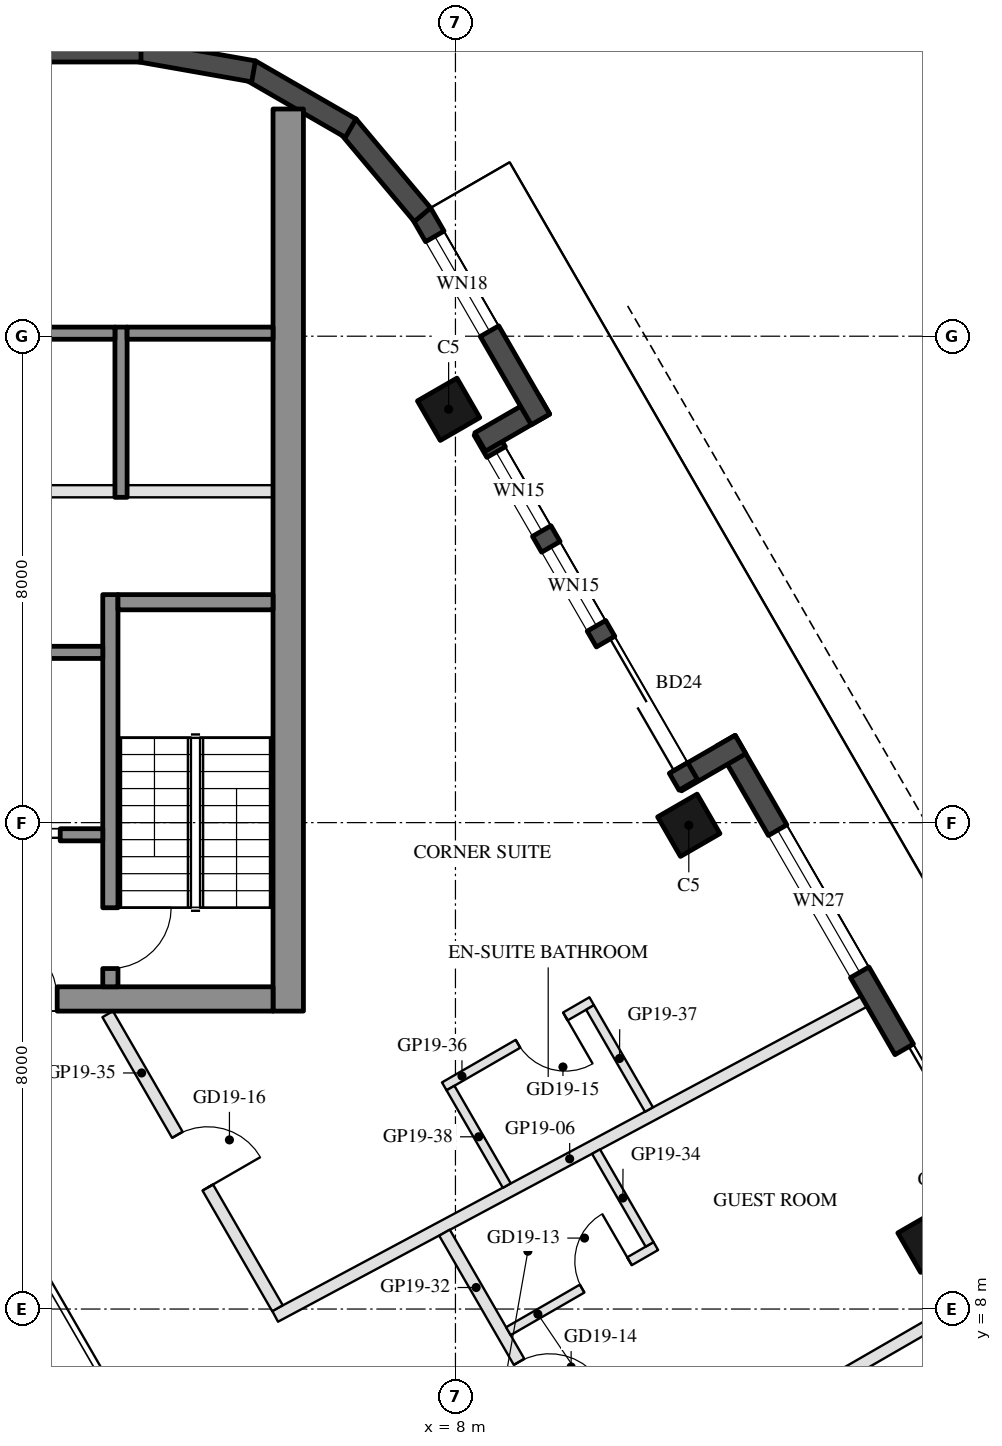
"""IFC4 building model, lengths in metres.
Left out: names, types, materials, properties, quantities, classifications, styles, units other than length and angle.
Written with IfcOpenShell. Run it as: python <this file> out.ifc"""

import sys

from ifc_helpers import new_model, si_unit, direction, frame, frame_2d, origin, origin_2d, place, context, subcontext, project, spatial, rectangle, hollow_rectangle, extrude, element, fill, save


model = new_model("IFC4")
c1 = context("Model", 3, precision=1e-05, world=origin(), true_north=direction((0.0, 1.0)))
c2 = subcontext(c1, "Body", "Model", "MODEL_VIEW")
j1 = project(units=[si_unit("LENGTHUNIT", "METRE"), si_unit("PLANEANGLEUNIT", "RADIAN")], contexts=[c1])
p1 = place(None, origin())
s1 = spatial("IfcSite", under=j1, at=p1, CompositionType="ELEMENT")
p2 = place(p1, origin())
s2 = spatial("IfcBuilding", under=s1, at=p2, CompositionType="ELEMENT")
p3 = place(p2, frame((0.0, 0.0, 205.8)))
s3 = spatial("IfcBuildingStorey", under=s2, at=p3, CompositionType="ELEMENT", Elevation=205.8)
for number, where, z_axis, x_axis in (
    (1, (15.788, 9.115, 0.0), (0.0, 0.0, 1.0), (-0.5, 0.866, 0.0)),
    (2, (11.838, 15.957, 0.0), (0.0, 0.0, 1.0), (-0.5, 0.866, 0.0)),
    (3, (7.888, 22.798, 0.0), (0.0, 0.0, 1.0), (-0.5, 0.866, 0.0)),
):
    element("IfcColumn", number, at=place(p3, frame(where, z_axis=z_axis, x_axis=x_axis)), inside=s3, PredefinedType="COLUMN", context=c2, shape_type="SweptSolid", body=[
        extrude(hollow_rectangle(XDim=0.75, YDim=0.75, WallThickness=0.035, at=origin_2d()), origin(), (0.0, 0.0, 1.0), 3.7),
    ])
p4 = place(p3, frame((17.299, 8.948, 0.0), z_axis=(0.0, 0.0, 1.0), x_axis=(-0.500010041276, 0.866019606374, 0.0)))
e4 = element("IfcWall", 4, at=p4, inside=s3, PredefinedType="SOLIDWALL", context=c2, shape_type="SweptSolid", body=[
    extrude(rectangle(XDim=9.7, YDim=0.35, at=frame_2d((4.85, 0.0))), origin(), (0.0, 0.0, 1.0), 3.55),
])
p5 = place(p4, frame((2.037, 0.0, 0.0)))
e5 = element("IfcOpeningElement", 5, at=p5, cuts=e4, PredefinedType="OPENING", context=c2, shape_type="SweptSolid", body=[
    extrude(rectangle(XDim=1.8, YDim=2.4, at=frame_2d((0.9, 1.2))), frame((0.0, 0.185, 0.0), z_axis=(0.0, -1.0, 0.0), x_axis=(1.0, 0.0, 0.0)), (0.0, 0.0, 1.0), 0.37),
])
p6 = place(p4, frame((5.3, 0.0, 0.3)))
e6 = element("IfcOpeningElement", 6, at=p6, cuts=e4, PredefinedType="OPENING", context=c2, shape_type="SweptSolid", body=[
    extrude(rectangle(XDim=2.7, YDim=2.65, at=frame_2d((1.35, 1.325))), frame((0.0, 0.185, 0.0), z_axis=(0.0, -1.0, 0.0), x_axis=(1.0, 0.0, 0.0)), (0.0, 0.0, 1.0), 0.37),
])
p7 = place(p3, frame((12.688, 17.284, 0.0), z_axis=(0.0, 0.0, 1.0), x_axis=(-0.865955602162, -0.500120880472, 0.0)))
e7 = element("IfcWall", 7, at=p7, inside=s3, PredefinedType="SOLIDWALL", context=c2, shape_type="SweptSolid", body=[
    extrude(rectangle(XDim=1.22, YDim=0.35, at=frame_2d((0.61, 0.0))), origin(), (0.0, 0.0, 1.0), 3.55),
])
p8 = place(p3, frame((11.829, 16.621, 0.0), z_axis=(0.0, 0.0, 1.0), x_axis=(-0.500003597184, 0.866023326939, 0.0)))
e8 = element("IfcWall", 8, at=p8, inside=s3, PredefinedType="SOLIDWALL", context=c2, shape_type="SweptSolid", body=[
    extrude(rectangle(XDim=6.74, YDim=0.35, at=frame_2d((3.37, 0.0))), origin(), (0.0, 0.0, 1.0), 3.55),
])
p9 = place(p8, frame((0.32, 0.0, 0.0)))
e9 = element("IfcOpeningElement", 9, at=p9, cuts=e8, PredefinedType="OPENING", context=c2, shape_type="SweptSolid", body=[
    extrude(rectangle(XDim=2.4, YDim=2.4, at=frame_2d((1.2, 1.2))), frame((0.0, 0.185, 0.0), z_axis=(0.0, -1.0, 0.0), x_axis=(1.0, 0.0, 0.0)), (0.0, 0.0, 1.0), 0.37),
])
p10 = place(p8, frame((3.02, 0.0, 0.3)))
e10 = element("IfcOpeningElement", 10, at=p10, cuts=e8, PredefinedType="OPENING", context=c2, shape_type="SweptSolid", body=[
    extrude(rectangle(XDim=1.5, YDim=2.65, at=frame_2d((0.75, 1.325))), frame((0.0, 0.185, 0.0), z_axis=(0.0, -1.0, 0.0), x_axis=(1.0, 0.0, 0.0)), (0.0, 0.0, 1.0), 0.37),
])
p11 = place(p8, frame((4.82, 0.0, 0.3)))
e11 = element("IfcOpeningElement", 11, at=p11, cuts=e8, PredefinedType="OPENING", context=c2, shape_type="SweptSolid", body=[
    extrude(rectangle(XDim=1.5, YDim=2.65, at=frame_2d((0.75, 1.325))), frame((0.0, 0.185, 0.0), z_axis=(0.0, -1.0, 0.0), x_axis=(1.0, 0.0, 0.0)), (0.0, 0.0, 1.0), 0.37),
])
p12 = place(p3, frame((8.406, 22.26, 0.0), z_axis=(0.0, 0.0, 1.0), x_axis=(0.865955602162, 0.500120880472, 0.0)))
e12 = element("IfcWall", 12, at=p12, inside=s3, PredefinedType="SOLIDWALL", context=c2, shape_type="SweptSolid", body=[
    extrude(rectangle(XDim=1.22, YDim=0.35, at=frame_2d((0.61, 0.0))), origin(), (0.0, 0.0, 1.0), 3.55),
])
p13 = place(p3, frame((9.398, 22.631, 0.0), z_axis=(0.0, 0.0, 1.0), x_axis=(-0.499954521343, 0.866051659307, 0.0)))
e13 = element("IfcWall", 13, at=p13, inside=s3, PredefinedType="SOLIDWALL", context=c2, shape_type="SweptSolid", body=[
    extrude(rectangle(XDim=3.916, YDim=0.35, at=frame_2d((1.958, 0.0))), origin(), (0.0, 0.0, 1.0), 3.55),
])
p14 = place(p13, frame((1.676, 0.0, 0.3)))
e14 = element("IfcOpeningElement", 14, at=p14, cuts=e13, PredefinedType="OPENING", context=c2, shape_type="SweptSolid", body=[
    extrude(rectangle(XDim=1.8, YDim=2.65, at=frame_2d((0.9, 1.325))), frame((0.0, 0.185, 0.0), z_axis=(0.0, -1.0, 0.0), x_axis=(1.0, 0.0, 0.0)), (0.0, 0.0, 1.0), 0.37),
])
p15 = place(p3, frame((7.458, 25.998, 0.0), z_axis=(0.0, 0.0, 1.0), x_axis=(-0.642808304945, 0.766027077259, 0.0)))
e15 = element("IfcWall", 15, at=p15, inside=s3, PredefinedType="SOLIDWALL", context=c2, shape_type="SweptSolid", body=[
    extrude(rectangle(XDim=1.91, YDim=0.35, at=frame_2d((0.955, 0.0))), origin(), (0.0, 0.0, 1.0), 3.55),
])
for number, where, z_axis, x_axis in (
    (16, (6.277, 27.422, 0.0), (0.0, 0.0, 1.0), (-0.866, 0.5, 0.0)),
    (17, (4.68, 28.356, 0.0), (0.0, 0.0, 1.0), (-0.985, 0.174, 0.0)),
):
    element("IfcWall", number, at=place(p3, frame(where, z_axis=z_axis, x_axis=x_axis)), inside=s3, PredefinedType="SOLIDWALL", context=c2, shape_type="SweptSolid", body=[
        extrude(rectangle(XDim=1.91, YDim=0.35, at=frame_2d((0.955, 0.0))), origin(), (0.0, 0.0, 1.0), 3.55),
    ])
p16 = place(p3, frame((2.829, 28.685, 0.0), z_axis=(0.0, 0.0, 1.0), x_axis=(-1.0, 0.0, 0.0)))
e18 = element("IfcWall", 18, at=p16, inside=s3, PredefinedType="SOLIDWALL", context=c2, shape_type="SweptSolid", body=[
    extrude(rectangle(XDim=5.658, YDim=0.35, at=frame_2d((2.829, 0.0))), origin(), (0.0, 0.0, 1.0), 3.55),
])
p17 = place(p3, frame((5.25, 12.9, 0.0), z_axis=(0.0, 0.0, 1.0), x_axis=(0.0, 1.0, 0.0)))
e19 = element("IfcWall", 19, at=p17, inside=s3, PredefinedType="SHEAR", context=c2, shape_type="SweptSolid", body=[
    extrude(rectangle(XDim=14.837, YDim=0.5, at=frame_2d((7.418, 0.0))), origin(), (0.0, 0.0, 1.0), 3.5),
])
p18 = place(p3, frame((5.0, 13.1, 0.0), z_axis=(0.0, 0.0, 1.0), x_axis=(-1.0, 0.0, 0.0)))
e20 = element("IfcWall", 20, at=p18, inside=s3, PredefinedType="SHEAR", context=c2, shape_type="SweptSolid", body=[
    extrude(rectangle(XDim=10.0, YDim=0.4, at=frame_2d((5.0, 0.0))), origin(), (0.0, 0.0, 1.0), 3.5),
])
p19 = place(p18, frame((3.55, 0.0, 0.0)))
e21 = element("IfcOpeningElement", 21, at=p19, cuts=e20, PredefinedType="OPENING", context=c2, shape_type="SweptSolid", body=[
    extrude(rectangle(XDim=1.1, YDim=2.1, at=frame_2d((0.55, 1.05))), frame((0.0, 0.21, 0.0), z_axis=(0.0, -1.0, 0.0), x_axis=(1.0, 0.0, 0.0)), (0.0, 0.0, 1.0), 0.42),
])
p20 = place(p18, frame((5.85, 0.0, 0.0)))
e22 = element("IfcOpeningElement", 22, at=p20, cuts=e20, PredefinedType="OPENING", context=c2, shape_type="SweptSolid", body=[
    extrude(rectangle(XDim=1.4, YDim=2.1, at=frame_2d((0.7, 1.05))), frame((0.0, 0.21, 0.0), z_axis=(0.0, -1.0, 0.0), x_axis=(1.0, 0.0, 0.0)), (0.0, 0.0, 1.0), 0.42),
])
p21 = place(p3, frame((2.325, 13.3, 0.0), z_axis=(0.0, 0.0, 1.0), x_axis=(0.0, 1.0, 0.0)))
e23 = element("IfcWall", 23, at=p21, inside=s3, PredefinedType="SHEAR", context=c2, shape_type="SweptSolid", body=[
    extrude(rectangle(XDim=6.45, YDim=0.25, at=frame_2d((3.225, 0.0))), origin(), (0.0, 0.0, 1.0), 3.5),
])
p22 = place(p21, frame((0.3, 0.0, 0.0)))
e24 = element("IfcOpeningElement", 24, at=p22, cuts=e23, PredefinedType="OPENING", context=c2, shape_type="SweptSolid", body=[
    extrude(rectangle(XDim=1.0, YDim=2.1, at=frame_2d((0.5, 1.05))), frame((0.0, 0.135, 0.0), z_axis=(0.0, -1.0, 0.0), x_axis=(1.0, 0.0, 0.0)), (0.0, 0.0, 1.0), 0.27),
])
p23 = place(p3, frame((5.0, 19.625, 0.0), z_axis=(0.0, 0.0, 1.0), x_axis=(-1.0, 0.0, 0.0)))
e25 = element("IfcWall", 25, at=p23, inside=s3, PredefinedType="SHEAR", context=c2, shape_type="SweptSolid", body=[
    extrude(rectangle(XDim=2.55, YDim=0.25, at=frame_2d((1.275, 0.0))), origin(), (0.0, 0.0, 1.0), 3.5),
])
p24 = place(p3, frame((2.2, 18.8, 0.0), z_axis=(0.0, 0.0, 1.0), x_axis=(-1.0, 0.0, 0.0)))
e26 = element("IfcWall", 26, at=p24, inside=s3, PredefinedType="SHEAR", context=c2, shape_type="SweptSolid", body=[
    extrude(rectangle(XDim=2.8, YDim=0.2, at=frame_2d((1.4, 0.0))), origin(), (0.0, 0.0, 1.0), 3.5),
])
p25 = place(p3, frame((2.2, 15.8, 0.0), z_axis=(0.0, 0.0, 1.0), x_axis=(-1.0, 0.0, 0.0)))
e27 = element("IfcWall", 27, at=p25, inside=s3, PredefinedType="SHEAR", context=c2, shape_type="SweptSolid", body=[
    extrude(rectangle(XDim=2.8, YDim=0.2, at=frame_2d((1.4, 0.0))), origin(), (0.0, 0.0, 1.0), 3.5),
])
p26 = place(p25, frame((0.7, 0.0, 0.0)))
e28 = element("IfcOpeningElement", 28, at=p26, cuts=e27, PredefinedType="OPENING", context=c2, shape_type="SweptSolid", body=[
    extrude(rectangle(XDim=1.2, YDim=2.1, at=frame_2d((0.6, 1.05))), frame((0.0, 0.11, 0.0), z_axis=(0.0, -1.0, 0.0), x_axis=(1.0, 0.0, 0.0)), (0.0, 0.0, 1.0), 0.22),
])
p27 = place(p3, frame((2.5, 21.35, 0.0), z_axis=(0.0, 0.0, 1.0), x_axis=(0.0, 1.0, 0.0)))
e29 = element("IfcWall", 29, at=p27, inside=s3, PredefinedType="SHEAR", context=c2, shape_type="SweptSolid", body=[
    extrude(rectangle(XDim=2.8, YDim=0.2, at=frame_2d((1.4, 0.0))), origin(), (0.0, 0.0, 1.0), 3.5),
])
p28 = place(p3, frame((5.0, 24.05, 0.0), z_axis=(0.0, 0.0, 1.0), x_axis=(-1.0, 0.0, 0.0)))
e30 = element("IfcWall", 30, at=p28, inside=s3, PredefinedType="SHEAR", context=c2, shape_type="SweptSolid", body=[
    extrude(rectangle(XDim=2.4, YDim=0.2, at=frame_2d((1.2, 0.0))), origin(), (0.0, 0.0, 1.0), 3.5),
])
p29 = place(p3, frame((2.4, 24.05, 0.0), z_axis=(0.0, 0.0, 1.0), x_axis=(-1.0, 0.0, 0.0)))
e31 = element("IfcWall", 31, at=p29, inside=s3, PredefinedType="SHEAR", context=c2, shape_type="SweptSolid", body=[
    extrude(rectangle(XDim=2.8, YDim=0.2, at=frame_2d((1.4, 0.0))), origin(), (0.0, 0.0, 1.0), 3.5),
])
p30 = place(p3, frame((5.0, 21.45, 0.0), z_axis=(0.0, 0.0, 1.0), x_axis=(-1.0, 0.0, 0.0)))
e32 = element("IfcWall", 32, at=p30, inside=s3, PredefinedType="PARTITIONING", context=c2, shape_type="SweptSolid", body=[
    extrude(rectangle(XDim=2.4, YDim=0.2, at=frame_2d((1.2, 0.0))), origin(), (0.0, 0.0, 1.0), 3.5),
])
p31 = place(p3, frame((2.4, 21.45, 0.0), z_axis=(0.0, 0.0, 1.0), x_axis=(-1.0, 0.0, 0.0)))
e33 = element("IfcWall", 33, at=p31, inside=s3, PredefinedType="PARTITIONING", context=c2, shape_type="SweptSolid", body=[
    extrude(rectangle(XDim=2.8, YDim=0.2, at=frame_2d((1.4, 0.0))), origin(), (0.0, 0.0, 1.0), 3.5),
])
p32 = place(p3, frame((16.518, 8.151, 0.0), z_axis=(0.0, 0.0, 1.0), x_axis=(-0.866027673501, -0.499996068715, 0.0)))
e34 = element("IfcWall", 34, at=p32, inside=s3, PredefinedType="PARTITIONING", context=c2, shape_type="SweptSolid", body=[
    extrude(rectangle(XDim=7.08, YDim=0.2, at=frame_2d((3.54, 0.0))), origin(), (0.0, 0.0, 1.0), 3.06),
])
p33 = place(p3, frame((14.722, 13.061, 0.0), z_axis=(0.0, 0.0, 1.0), x_axis=(-0.881785716662, -0.471650241059, 0.0)))
e35 = element("IfcWall", 35, at=p33, inside=s3, PredefinedType="PARTITIONING", context=c2, shape_type="SweptSolid", body=[
    extrude(rectangle(XDim=10.986, YDim=0.2, at=frame_2d((5.493, 0.0))), origin(), (0.0, 0.0, 1.0), 2.95),
])
p34 = place(p3, frame((7.82, 9.256, 0.0), z_axis=(0.0, 0.0, 1.0), x_axis=(0.499987686533, -0.866032512851, 0.0)))
e36 = element("IfcWall", 36, at=p34, inside=s3, PredefinedType="PARTITIONING", context=c2, shape_type="SweptSolid", body=[
    extrude(rectangle(XDim=5.206, YDim=0.2, at=frame_2d((2.603, 0.0))), origin(), (0.0, 0.0, 1.0), 2.95),
])
p35 = place(p34, frame((2.453, 0.0, 0.0)))
e37 = element("IfcOpeningElement", 37, at=p35, cuts=e36, PredefinedType="OPENING", context=c2, shape_type="SweptSolid", body=[
    extrude(rectangle(XDim=1.0, YDim=2.1, at=frame_2d((0.5, 1.05))), frame((0.0, 0.11, 0.0), z_axis=(0.0, -1.0, 0.0), x_axis=(1.0, 0.0, 0.0)), (0.0, 0.0, 1.0), 0.22),
])
p36 = place(p3, frame((8.871, 7.636, 0.0), z_axis=(0.0, 0.0, 1.0), x_axis=(0.865996816683, 0.500049511043, 0.0)))
e38 = element("IfcWall", 38, at=p36, inside=s3, PredefinedType="PARTITIONING", context=c2, shape_type="SweptSolid", body=[
    extrude(rectangle(XDim=2.8, YDim=0.15, at=frame_2d((1.4, 0.0))), origin(), (0.0, 0.0, 1.0), 3.55),
])
p37 = place(p36, frame((1.4, 0.0, 0.0)))
e39 = element("IfcOpeningElement", 39, at=p37, cuts=e38, PredefinedType="OPENING", context=c2, shape_type="SweptSolid", body=[
    extrude(rectangle(XDim=0.9, YDim=2.1, at=frame_2d((0.45, 1.05))), frame((0.0, 0.085, 0.0), z_axis=(0.0, -1.0, 0.0), x_axis=(1.0, 0.0, 0.0)), (0.0, 0.0, 1.0), 0.17),
])
p38 = place(p3, frame((11.193, 9.063, 0.0), z_axis=(0.0, 0.0, 1.0), x_axis=(-0.499910413417, 0.866077120444, 0.0)))
e40 = element("IfcWall", 40, at=p38, inside=s3, PredefinedType="PARTITIONING", context=c2, shape_type="SweptSolid", body=[
    extrude(rectangle(XDim=1.761, YDim=0.15, at=frame_2d((0.881, 0.0))), origin(), (0.0, 0.0, 1.0), 2.95),
])
p39 = place(p3, frame((2.281, 12.85, 0.0), z_axis=(0.0, 0.0, 1.0), x_axis=(0.500003731568, -0.866023249352, 0.0)))
e41 = element("IfcWall", 41, at=p39, inside=s3, PredefinedType="PARTITIONING", context=c2, shape_type="SweptSolid", body=[
    extrude(rectangle(XDim=5.585, YDim=0.2, at=frame_2d((2.792, 0.0))), origin(), (0.0, 0.0, 1.0), 2.95),
])
p40 = place(p39, frame((2.292, 0.0, 0.0)))
e42 = element("IfcOpeningElement", 42, at=p40, cuts=e41, PredefinedType="OPENING", context=c2, shape_type="SweptSolid", body=[
    extrude(rectangle(XDim=1.0, YDim=2.1, at=frame_2d((0.5, 1.05))), frame((0.0, 0.11, 0.0), z_axis=(0.0, -1.0, 0.0), x_axis=(1.0, 0.0, 0.0)), (0.0, 0.0, 1.0), 0.22),
])
p41 = place(p3, frame((10.241, 13.062, 0.0), z_axis=(0.0, 0.0, 1.0), x_axis=(-0.865996816683, -0.500049511043, 0.0)))
e43 = element("IfcWall", 43, at=p41, inside=s3, PredefinedType="PARTITIONING", context=c2, shape_type="SweptSolid", body=[
    extrude(rectangle(XDim=2.8, YDim=0.15, at=frame_2d((1.4, 0.0))), origin(), (0.0, 0.0, 1.0), 3.55),
])
p42 = place(p41, frame((0.5, 0.0, 0.0)))
e44 = element("IfcOpeningElement", 44, at=p42, cuts=e43, PredefinedType="OPENING", context=c2, shape_type="SweptSolid", body=[
    extrude(rectangle(XDim=0.9, YDim=2.1, at=frame_2d((0.45, 1.05))), frame((0.0, 0.085, 0.0), z_axis=(0.0, -1.0, 0.0), x_axis=(1.0, 0.0, 0.0)), (0.0, 0.0, 1.0), 0.17),
])
p43 = place(p3, frame((11.183, 11.281, 0.0), z_axis=(0.0, 0.0, 1.0), x_axis=(-0.500013181875, 0.866017793092, 0.0)))
e45 = element("IfcWall", 45, at=p43, inside=s3, PredefinedType="PARTITIONING", context=c2, shape_type="SweptSolid", body=[
    extrude(rectangle(XDim=1.938, YDim=0.15, at=frame_2d((0.969, 0.0))), origin(), (0.0, 0.0, 1.0), 3.55),
])
p44 = place(p3, frame((8.844, 10.031, 0.0), z_axis=(0.0, 0.0, 1.0), x_axis=(-0.499924019097, 0.866069266935, 0.0)))
e46 = element("IfcWall", 46, at=p44, inside=s3, PredefinedType="PARTITIONING", context=c2, shape_type="SweptSolid", body=[
    extrude(rectangle(XDim=1.852, YDim=0.15, at=frame_2d((0.926, 0.0))), origin(), (0.0, 0.0, 1.0), 3.55),
])
p45 = place(p5, frame((1.8, 0.0, 0.0), z_axis=(0.0, 0.0, 1.0), x_axis=(-1.0, 0.0, 0.0)))
e47 = element("IfcDoor", 47, at=p45, inside=s3, OperationType="SLIDING_TO_LEFT", PredefinedType="DOOR", context=c2, shape_type="SweptSolid", body=[
    extrude(rectangle(XDim=1.8, YDim=2.4, at=frame_2d((0.9, 1.2))), frame((0.0, 0.025, 0.0), z_axis=(0.0, -1.0, 0.0), x_axis=(1.0, 0.0, 0.0)), (0.0, 0.0, 1.0), 0.05),
])
fill(e5, e47)
p46 = place(p6, origin())
e48 = element("IfcWindow", 48, at=p46, inside=s3, PartitioningType="SINGLE_PANEL", PredefinedType="WINDOW", context=c2, shape_type="SweptSolid", body=[
    extrude(rectangle(XDim=2.7, YDim=2.65, at=frame_2d((1.35, 1.325))), frame((0.0, 0.03, 0.0), z_axis=(0.0, -1.0, 0.0), x_axis=(1.0, 0.0, 0.0)), (0.0, 0.0, 1.0), 0.06),
])
fill(e6, e48)
p47 = place(p9, frame((2.4, 0.0, 0.0), z_axis=(0.0, 0.0, 1.0), x_axis=(-1.0, 0.0, 0.0)))
e49 = element("IfcDoor", 49, at=p47, inside=s3, OperationType="SLIDING_TO_LEFT", PredefinedType="DOOR", context=c2, shape_type="SweptSolid", body=[
    extrude(rectangle(XDim=2.4, YDim=2.4, at=frame_2d((1.2, 1.2))), frame((0.0, 0.025, 0.0), z_axis=(0.0, -1.0, 0.0), x_axis=(1.0, 0.0, 0.0)), (0.0, 0.0, 1.0), 0.05),
])
fill(e9, e49)
p48 = place(p10, origin())
e50 = element("IfcWindow", 50, at=p48, inside=s3, PartitioningType="SINGLE_PANEL", PredefinedType="WINDOW", context=c2, shape_type="SweptSolid", body=[
    extrude(rectangle(XDim=1.5, YDim=2.65, at=frame_2d((0.75, 1.325))), frame((0.0, 0.03, 0.0), z_axis=(0.0, -1.0, 0.0), x_axis=(1.0, 0.0, 0.0)), (0.0, 0.0, 1.0), 0.06),
])
fill(e10, e50)
p49 = place(p11, origin())
e51 = element("IfcWindow", 51, at=p49, inside=s3, PartitioningType="SINGLE_PANEL", PredefinedType="WINDOW", context=c2, shape_type="SweptSolid", body=[
    extrude(rectangle(XDim=1.5, YDim=2.65, at=frame_2d((0.75, 1.325))), frame((0.0, 0.03, 0.0), z_axis=(0.0, -1.0, 0.0), x_axis=(1.0, 0.0, 0.0)), (0.0, 0.0, 1.0), 0.06),
])
fill(e11, e51)
p50 = place(p14, origin())
e52 = element("IfcWindow", 52, at=p50, inside=s3, PartitioningType="SINGLE_PANEL", PredefinedType="WINDOW", context=c2, shape_type="SweptSolid", body=[
    extrude(rectangle(XDim=1.8, YDim=2.65, at=frame_2d((0.9, 1.325))), frame((0.0, 0.03, 0.0), z_axis=(0.0, -1.0, 0.0), x_axis=(1.0, 0.0, 0.0)), (0.0, 0.0, 1.0), 0.06),
])
fill(e14, e52)
p51 = place(p26, origin())
e53 = element("IfcDoor", 53, at=p51, inside=s3, OperationType="DOUBLE_DOOR_SLIDING", PredefinedType="DOOR", context=c2, shape_type="SweptSolid", body=[
    extrude(rectangle(XDim=1.2, YDim=2.1, at=frame_2d((0.6, 1.05))), frame((0.0, 0.025, 0.0), z_axis=(0.0, -1.0, 0.0), x_axis=(1.0, 0.0, 0.0)), (0.0, 0.0, 1.0), 0.05),
])
fill(e28, e53)
p52 = place(p19, frame((1.1, 0.0, 0.0), z_axis=(0.0, 0.0, 1.0), x_axis=(-1.0, 0.0, 0.0)))
e54 = element("IfcDoor", 54, at=p52, inside=s3, OperationType="SINGLE_SWING_LEFT", PredefinedType="DOOR", context=c2, shape_type="SweptSolid", body=[
    extrude(rectangle(XDim=1.1, YDim=2.1, at=frame_2d((0.55, 1.05))), frame((0.0, 0.025, 0.0), z_axis=(0.0, -1.0, 0.0), x_axis=(1.0, 0.0, 0.0)), (0.0, 0.0, 1.0), 0.05),
])
fill(e21, e54)
p53 = place(p22, frame((1.0, 0.0, 0.0), z_axis=(0.0, 0.0, 1.0), x_axis=(-1.0, 0.0, 0.0)))
e55 = element("IfcDoor", 55, at=p53, inside=s3, OperationType="SINGLE_SWING_LEFT", PredefinedType="DOOR", context=c2, shape_type="SweptSolid", body=[
    extrude(rectangle(XDim=1.0, YDim=2.1, at=frame_2d((0.5, 1.05))), frame((0.0, 0.025, 0.0), z_axis=(0.0, -1.0, 0.0), x_axis=(1.0, 0.0, 0.0)), (0.0, 0.0, 1.0), 0.05),
])
fill(e24, e55)
p54 = place(p37, origin())
e56 = element("IfcDoor", 56, at=p54, inside=s3, OperationType="SINGLE_SWING_RIGHT", PredefinedType="DOOR", context=c2, shape_type="SweptSolid", body=[
    extrude(rectangle(XDim=0.9, YDim=2.1, at=frame_2d((0.45, 1.05))), frame((0.0, 0.025, 0.0), z_axis=(0.0, -1.0, 0.0), x_axis=(1.0, 0.0, 0.0)), (0.0, 0.0, 1.0), 0.05),
])
fill(e39, e56)
p55 = place(p35, origin())
e57 = element("IfcDoor", 57, at=p55, inside=s3, OperationType="SINGLE_SWING_RIGHT", PredefinedType="DOOR", context=c2, shape_type="SweptSolid", body=[
    extrude(rectangle(XDim=1.0, YDim=2.1, at=frame_2d((0.5, 1.05))), frame((0.0, 0.025, 0.0), z_axis=(0.0, -1.0, 0.0), x_axis=(1.0, 0.0, 0.0)), (0.0, 0.0, 1.0), 0.05),
])
fill(e37, e57)
p56 = place(p42, origin())
e58 = element("IfcDoor", 58, at=p56, inside=s3, OperationType="SINGLE_SWING_LEFT", PredefinedType="DOOR", context=c2, shape_type="SweptSolid", body=[
    extrude(rectangle(XDim=0.9, YDim=2.1, at=frame_2d((0.45, 1.05))), frame((0.0, 0.025, 0.0), z_axis=(0.0, -1.0, 0.0), x_axis=(1.0, 0.0, 0.0)), (0.0, 0.0, 1.0), 0.05),
])
fill(e44, e58)
p57 = place(p40, origin())
e59 = element("IfcDoor", 59, at=p57, inside=s3, OperationType="SINGLE_SWING_RIGHT", PredefinedType="DOOR", context=c2, shape_type="SweptSolid", body=[
    extrude(rectangle(XDim=1.0, YDim=2.1, at=frame_2d((0.5, 1.05))), frame((0.0, 0.025, 0.0), z_axis=(0.0, -1.0, 0.0), x_axis=(1.0, 0.0, 0.0)), (0.0, 0.0, 1.0), 0.05),
])
fill(e42, e59)
save(model, sys.argv[1])
